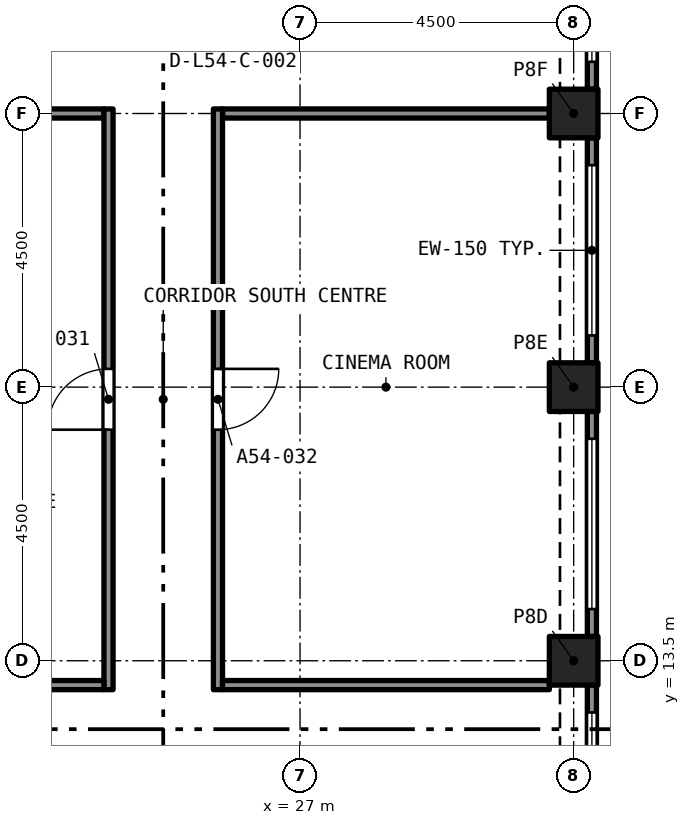
"""IFC4 building model, lengths in metres.
Left out: names, types, materials, properties, quantities, classifications, styles, units other than length and angle.
Written with IfcOpenShell. Run it as: python <this file> out.ifc"""

import sys

from ifc_helpers import new_model, si_unit, direction, frame, frame_2d, origin, origin_2d, place, context, subcontext, project, spatial, rectangle, extrude, element, fill, save


model = new_model("IFC4")
c1 = context("Model", 3, precision=1e-05, world=origin(), true_north=direction((0.0, 1.0)))
c2 = subcontext(c1, "Body", "Model", "MODEL_VIEW")
j1 = project(units=[si_unit("LENGTHUNIT", "METRE"), si_unit("PLANEANGLEUNIT", "RADIAN")], contexts=[c1])
p1 = place(None, origin())
s1 = spatial("IfcSite", under=j1, at=p1, CompositionType="ELEMENT")
p2 = place(p1, origin())
s2 = spatial("IfcBuilding", under=s1, at=p2, CompositionType="ELEMENT")
p3 = place(p2, frame((0.0, 0.0, 195.5)))
s3 = spatial("IfcBuildingStorey", under=s2, at=p3, CompositionType="ELEMENT", Elevation=195.5)
for number, where, z_axis, x_axis in (
    (1, (31.5, 13.5, 0.0), (0.0, 0.0, 1.0), (1.0, 0.0, 0.0)),
    (2, (31.5, 18.0, 0.0), (0.0, 0.0, 1.0), (1.0, 0.0, 0.0)),
    (3, (31.5, 22.5, 0.0), (0.0, 0.0, 1.0), (1.0, 0.0, 0.0)),
):
    element("IfcColumn", number, at=place(p3, frame(where, z_axis=z_axis, x_axis=x_axis)), inside=s3, PredefinedType="COLUMN", context=c2, shape_type="SweptSolid", body=[
        extrude(rectangle(XDim=0.8, YDim=0.8, at=origin_2d()), origin(), (0.0, 0.0, 1.0), 3.2),
    ])
p4 = place(p3, frame((31.8, 13.1, 0.0), z_axis=(0.0, 0.0, 1.0), x_axis=(0.0, -1.0, 0.0)))
e4 = element("IfcWall", 4, at=p4, inside=s3, PredefinedType="SOLIDWALL", context=c2, shape_type="SweptSolid", body=[
    extrude(rectangle(XDim=3.7, YDim=0.15, at=frame_2d((1.85, 0.0))), origin(), (0.0, 0.0, 1.0), 3.2),
])
p5 = place(p4, frame((0.45, 0.0, 0.45)))
e5 = element("IfcOpeningElement", 5, at=p5, cuts=e4, PredefinedType="OPENING", context=c2, shape_type="SweptSolid", body=[
    extrude(rectangle(XDim=2.8, YDim=1.95, at=frame_2d((1.4, 0.975))), frame((0.0, 0.085, 0.0), z_axis=(0.0, -1.0, 0.0), x_axis=(1.0, 0.0, 0.0)), (0.0, 0.0, 1.0), 0.17),
])
p6 = place(p3, frame((31.8, 17.6, 0.0), z_axis=(0.0, 0.0, 1.0), x_axis=(0.0, -1.0, 0.0)))
e6 = element("IfcWall", 6, at=p6, inside=s3, PredefinedType="SOLIDWALL", context=c2, shape_type="SweptSolid", body=[
    extrude(rectangle(XDim=3.7, YDim=0.15, at=frame_2d((1.85, 0.0))), origin(), (0.0, 0.0, 1.0), 3.2),
])
p7 = place(p6, frame((0.45, 0.0, 0.45)))
e7 = element("IfcOpeningElement", 7, at=p7, cuts=e6, PredefinedType="OPENING", context=c2, shape_type="SweptSolid", body=[
    extrude(rectangle(XDim=2.8, YDim=1.95, at=frame_2d((1.4, 0.975))), frame((0.0, 0.085, 0.0), z_axis=(0.0, -1.0, 0.0), x_axis=(1.0, 0.0, 0.0)), (0.0, 0.0, 1.0), 0.17),
])
p8 = place(p3, frame((31.8, 22.1, 0.0), z_axis=(0.0, 0.0, 1.0), x_axis=(0.0, -1.0, 0.0)))
e8 = element("IfcWall", 8, at=p8, inside=s3, PredefinedType="SOLIDWALL", context=c2, shape_type="SweptSolid", body=[
    extrude(rectangle(XDim=3.7, YDim=0.15, at=frame_2d((1.85, 0.0))), origin(), (0.0, 0.0, 1.0), 3.2),
])
p9 = place(p8, frame((0.45, 0.0, 0.45)))
e9 = element("IfcOpeningElement", 9, at=p9, cuts=e8, PredefinedType="OPENING", context=c2, shape_type="SweptSolid", body=[
    extrude(rectangle(XDim=2.8, YDim=1.95, at=frame_2d((1.4, 0.975))), frame((0.0, 0.085, 0.0), z_axis=(0.0, -1.0, 0.0), x_axis=(1.0, 0.0, 0.0)), (0.0, 0.0, 1.0), 0.17),
])
p10 = place(p3, frame((31.8, 26.6, 0.0), z_axis=(0.0, 0.0, 1.0), x_axis=(0.0, -1.0, 0.0)))
e10 = element("IfcWall", 10, at=p10, inside=s3, PredefinedType="SOLIDWALL", context=c2, shape_type="SweptSolid", body=[
    extrude(rectangle(XDim=3.7, YDim=0.15, at=frame_2d((1.85, 0.0))), origin(), (0.0, 0.0, 1.0), 3.2),
])
p11 = place(p10, frame((0.45, 0.0, 0.45)))
e11 = element("IfcOpeningElement", 11, at=p11, cuts=e10, PredefinedType="OPENING", context=c2, shape_type="SweptSolid", body=[
    extrude(rectangle(XDim=2.8, YDim=1.95, at=frame_2d((1.4, 0.975))), frame((0.0, 0.085, 0.0), z_axis=(0.0, -1.0, 0.0), x_axis=(1.0, 0.0, 0.0)), (0.0, 0.0, 1.0), 0.17),
])
for number, where, z_axis, x_axis in (
    (12, (18.4, 22.5, 0.0), (0.0, 0.0, 1.0), (1.0, 0.0, 0.0)),
    (13, (25.725, 22.5, 0.0), (0.0, 0.0, 1.0), (1.0, 0.0, 0.0)),
):
    element("IfcWall", number, at=place(p3, frame(where, z_axis=z_axis, x_axis=x_axis)), inside=s3, PredefinedType="PARTITIONING", context=c2, shape_type="SweptSolid", body=[
        extrude(rectangle(XDim=5.375, YDim=0.15, at=frame_2d((2.688, 0.0))), origin(), (0.0, 0.0, 1.0), 2.75),
    ])
p12 = place(p3, frame((23.85, 13.025, 0.0), z_axis=(0.0, 0.0, 1.0), x_axis=(0.0, 1.0, 0.0)))
e14 = element("IfcWall", 14, at=p12, inside=s3, PredefinedType="PARTITIONING", context=c2, shape_type="SweptSolid", body=[
    extrude(rectangle(XDim=9.55, YDim=0.15, at=frame_2d((4.775, 0.0))), origin(), (0.0, 0.0, 1.0), 2.75),
])
p13 = place(p12, frame((4.275, 0.0, 0.0)))
e15 = element("IfcOpeningElement", 15, at=p13, cuts=e14, PredefinedType="OPENING", context=c2, shape_type="SweptSolid", body=[
    extrude(rectangle(XDim=1.0, YDim=2.1, at=frame_2d((0.5, 1.05))), frame((0.0, 0.085, 0.0), z_axis=(0.0, -1.0, 0.0), x_axis=(1.0, 0.0, 0.0)), (0.0, 0.0, 1.0), 0.17),
])
p14 = place(p3, frame((25.65, 22.575, 0.0), z_axis=(0.0, 0.0, 1.0), x_axis=(0.0, -1.0, 0.0)))
e16 = element("IfcWall", 16, at=p14, inside=s3, PredefinedType="PARTITIONING", context=c2, shape_type="SweptSolid", body=[
    extrude(rectangle(XDim=9.55, YDim=0.15, at=frame_2d((4.775, 0.0))), origin(), (0.0, 0.0, 1.0), 2.75),
])
p15 = place(p14, frame((4.275, 0.0, 0.0)))
e17 = element("IfcOpeningElement", 17, at=p15, cuts=e16, PredefinedType="OPENING", context=c2, shape_type="SweptSolid", body=[
    extrude(rectangle(XDim=1.0, YDim=2.1, at=frame_2d((0.5, 1.05))), frame((0.0, 0.085, 0.0), z_axis=(0.0, -1.0, 0.0), x_axis=(1.0, 0.0, 0.0)), (0.0, 0.0, 1.0), 0.17),
])
for number, where, z_axis, x_axis in (
    (18, (18.4, 13.1, 0.0), (0.0, 0.0, 1.0), (1.0, 0.0, 0.0)),
    (19, (25.725, 13.1, 0.0), (0.0, 0.0, 1.0), (1.0, 0.0, 0.0)),
):
    element("IfcWall", number, at=place(p3, frame(where, z_axis=z_axis, x_axis=x_axis)), inside=s3, PredefinedType="PARTITIONING", context=c2, shape_type="SweptSolid", body=[
        extrude(rectangle(XDim=5.375, YDim=0.15, at=frame_2d((2.688, 0.0))), origin(), (0.0, 0.0, 1.0), 2.75),
    ])
p16 = place(p5, origin())
e20 = element("IfcWindow", 20, at=p16, inside=s3, PartitioningType="SINGLE_PANEL", PredefinedType="WINDOW", context=c2, shape_type="SweptSolid", body=[
    extrude(rectangle(XDim=2.8, YDim=1.95, at=frame_2d((1.4, 0.975))), frame((0.0, 0.03, 0.0), z_axis=(0.0, -1.0, 0.0), x_axis=(1.0, 0.0, 0.0)), (0.0, 0.0, 1.0), 0.06),
])
fill(e5, e20)
p17 = place(p7, origin())
e21 = element("IfcWindow", 21, at=p17, inside=s3, PartitioningType="SINGLE_PANEL", PredefinedType="WINDOW", context=c2, shape_type="SweptSolid", body=[
    extrude(rectangle(XDim=2.8, YDim=1.95, at=frame_2d((1.4, 0.975))), frame((0.0, 0.03, 0.0), z_axis=(0.0, -1.0, 0.0), x_axis=(1.0, 0.0, 0.0)), (0.0, 0.0, 1.0), 0.06),
])
fill(e7, e21)
p18 = place(p9, origin())
e22 = element("IfcWindow", 22, at=p18, inside=s3, PartitioningType="SINGLE_PANEL", PredefinedType="WINDOW", context=c2, shape_type="SweptSolid", body=[
    extrude(rectangle(XDim=2.8, YDim=1.95, at=frame_2d((1.4, 0.975))), frame((0.0, 0.03, 0.0), z_axis=(0.0, -1.0, 0.0), x_axis=(1.0, 0.0, 0.0)), (0.0, 0.0, 1.0), 0.06),
])
fill(e9, e22)
p19 = place(p11, origin())
e23 = element("IfcWindow", 23, at=p19, inside=s3, PartitioningType="SINGLE_PANEL", PredefinedType="WINDOW", context=c2, shape_type="SweptSolid", body=[
    extrude(rectangle(XDim=2.8, YDim=1.95, at=frame_2d((1.4, 0.975))), frame((0.0, 0.03, 0.0), z_axis=(0.0, -1.0, 0.0), x_axis=(1.0, 0.0, 0.0)), (0.0, 0.0, 1.0), 0.06),
])
fill(e11, e23)
p20 = place(p13, origin())
e24 = element("IfcDoor", 24, at=p20, inside=s3, OperationType="SINGLE_SWING_RIGHT", PredefinedType="DOOR", context=c2, shape_type="SweptSolid", body=[
    extrude(rectangle(XDim=1.0, YDim=2.1, at=frame_2d((0.5, 1.05))), frame((0.0, 0.025, 0.0), z_axis=(0.0, -1.0, 0.0), x_axis=(1.0, 0.0, 0.0)), (0.0, 0.0, 1.0), 0.05),
])
fill(e15, e24)
p21 = place(p15, origin())
e25 = element("IfcDoor", 25, at=p21, inside=s3, OperationType="SINGLE_SWING_LEFT", PredefinedType="DOOR", context=c2, shape_type="SweptSolid", body=[
    extrude(rectangle(XDim=1.0, YDim=2.1, at=frame_2d((0.5, 1.05))), frame((0.0, 0.025, 0.0), z_axis=(0.0, -1.0, 0.0), x_axis=(1.0, 0.0, 0.0)), (0.0, 0.0, 1.0), 0.05),
])
fill(e17, e25)
save(model, sys.argv[1])
